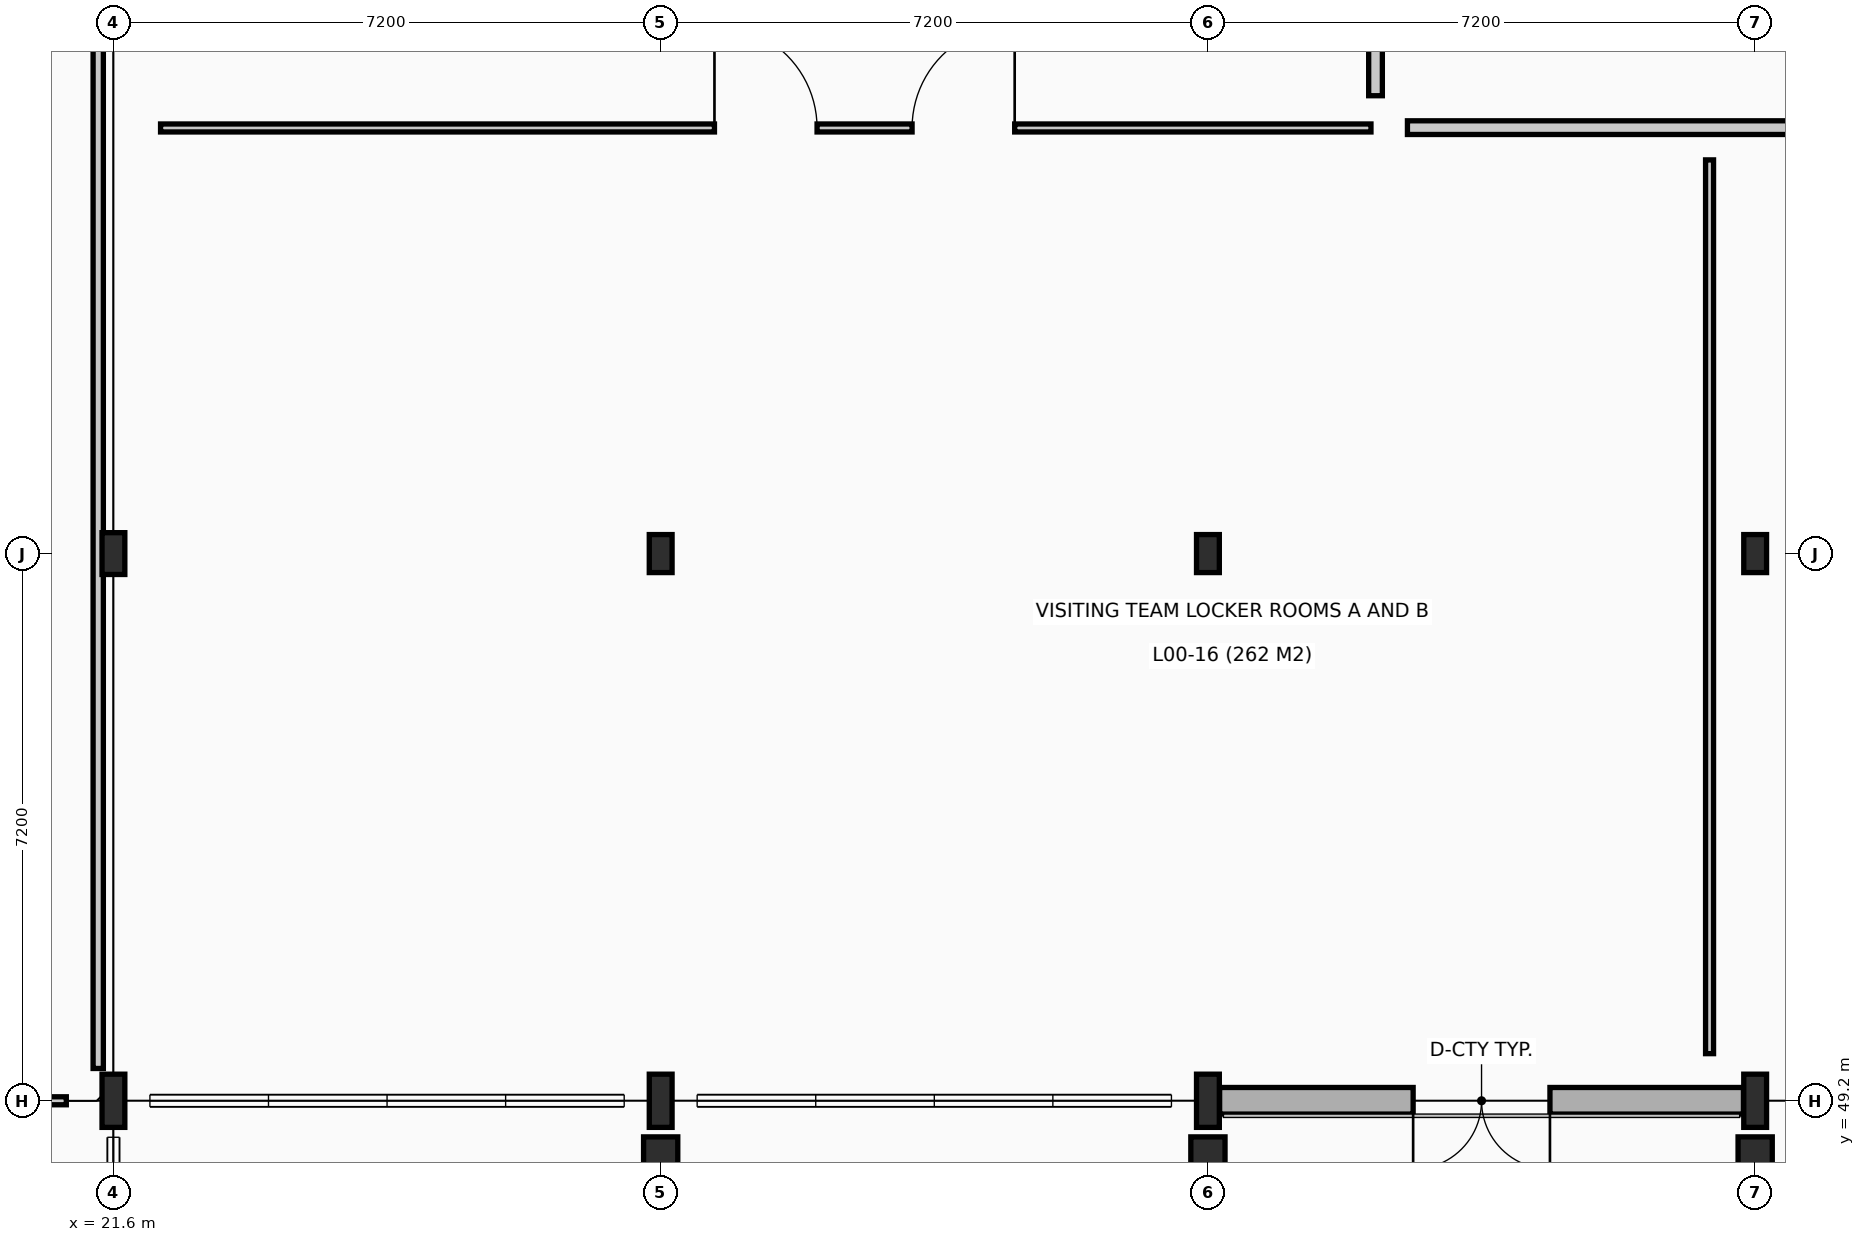
"""IFC4 building model, lengths in metres.
Left out: names, types, materials, properties, quantities, classifications, styles, units other than length and angle.
Written with IfcOpenShell. Run it as: python <this file> out.ifc"""

import sys

from ifc_helpers import new_model, si_unit, direction, frame, frame_2d, origin, origin_2d, place, context, subcontext, project, spatial, rectangle, i_section, extrude, element, fill, save


model = new_model("IFC4")
c1 = context("Model", 3, precision=1e-05, world=origin(), true_north=direction((0.0, 1.0)))
c2 = subcontext(c1, "Body", "Model", "MODEL_VIEW")
j1 = project(units=[si_unit("LENGTHUNIT", "METRE"), si_unit("PLANEANGLEUNIT", "RADIAN")], contexts=[c1])
p1 = place(None, origin())
s1 = spatial("IfcSite", under=j1, at=p1, CompositionType="ELEMENT")
p2 = place(p1, origin())
s2 = spatial("IfcBuilding", under=s1, at=p2, CompositionType="ELEMENT")
p3 = place(p2, origin())
s3 = spatial("IfcBuildingStorey", under=s2, at=p3, CompositionType="ELEMENT", Elevation=0.0)
p4 = place(p3, frame((21.6, 49.2, 0.0), z_axis=(0.0, 0.0, 1.0), x_axis=(1.0, 0.0, 0.0)))
e1 = element("IfcColumn", 1, at=p4, inside=s3, PredefinedType="COLUMN", context=c2, shape_type="SweptSolid", body=[
    extrude(i_section(OverallWidth=0.3, OverallDepth=0.7, WebThickness=0.017, FlangeThickness=0.032, at=origin_2d()), origin(), (0.0, 0.0, 1.0), 4.8),
])
p5 = place(p3, frame((21.6, 56.4, 0.0), z_axis=(0.0, 0.0, 1.0), x_axis=(1.0, 0.0, 0.0)))
e2 = element("IfcColumn", 2, at=p5, inside=s3, PredefinedType="COLUMN", context=c2, shape_type="SweptSolid", body=[
    extrude(i_section(OverallWidth=0.3, OverallDepth=0.55, WebThickness=0.015, FlangeThickness=0.029, at=origin_2d()), origin(), (0.0, 0.0, 1.0), 4.8),
])
p6 = place(p3, frame((28.8, 49.2, 0.0), z_axis=(0.0, 0.0, 1.0), x_axis=(1.0, 0.0, 0.0)))
e3 = element("IfcColumn", 3, at=p6, inside=s3, PredefinedType="COLUMN", context=c2, shape_type="SweptSolid", body=[
    extrude(i_section(OverallWidth=0.3, OverallDepth=0.7, WebThickness=0.017, FlangeThickness=0.032, at=origin_2d()), origin(), (0.0, 0.0, 1.0), 4.8),
])
p7 = place(p3, frame((28.8, 56.4, 0.0), z_axis=(0.0, 0.0, 1.0), x_axis=(1.0, 0.0, 0.0)))
e4 = element("IfcColumn", 4, at=p7, inside=s3, PredefinedType="COLUMN", context=c2, shape_type="SweptSolid", body=[
    extrude(i_section(OverallWidth=0.3, OverallDepth=0.5, WebThickness=0.014, FlangeThickness=0.028, at=origin_2d()), origin(), (0.0, 0.0, 1.0), 4.8),
])
p8 = place(p3, frame((36.0, 49.2, 0.0), z_axis=(0.0, 0.0, 1.0), x_axis=(1.0, 0.0, 0.0)))
e5 = element("IfcColumn", 5, at=p8, inside=s3, PredefinedType="COLUMN", context=c2, shape_type="SweptSolid", body=[
    extrude(i_section(OverallWidth=0.3, OverallDepth=0.7, WebThickness=0.017, FlangeThickness=0.032, at=origin_2d()), origin(), (0.0, 0.0, 1.0), 4.8),
])
p9 = place(p3, frame((36.0, 56.4, 0.0), z_axis=(0.0, 0.0, 1.0), x_axis=(1.0, 0.0, 0.0)))
e6 = element("IfcColumn", 6, at=p9, inside=s3, PredefinedType="COLUMN", context=c2, shape_type="SweptSolid", body=[
    extrude(i_section(OverallWidth=0.3, OverallDepth=0.5, WebThickness=0.014, FlangeThickness=0.028, at=origin_2d()), origin(), (0.0, 0.0, 1.0), 4.8),
])
p10 = place(p3, frame((43.2, 49.2, 0.0), z_axis=(0.0, 0.0, 1.0), x_axis=(1.0, 0.0, 0.0)))
e7 = element("IfcColumn", 7, at=p10, inside=s3, PredefinedType="COLUMN", context=c2, shape_type="SweptSolid", body=[
    extrude(i_section(OverallWidth=0.3, OverallDepth=0.7, WebThickness=0.017, FlangeThickness=0.032, at=origin_2d()), origin(), (0.0, 0.0, 1.0), 4.8),
])
p11 = place(p3, frame((43.2, 56.4, 0.0), z_axis=(0.0, 0.0, 1.0), x_axis=(1.0, 0.0, 0.0)))
e8 = element("IfcColumn", 8, at=p11, inside=s3, PredefinedType="COLUMN", context=c2, shape_type="SweptSolid", body=[
    extrude(i_section(OverallWidth=0.3, OverallDepth=0.5, WebThickness=0.014, FlangeThickness=0.028, at=origin_2d()), origin(), (0.0, 0.0, 1.0), 4.8),
])
for number, where, z_axis, x_axis in (
    (9, (28.8, 48.4, 0.0), (0.0, 0.0, 1.0), (1.0, 0.0, 0.0)),
    (10, (36.0, 48.4, 0.0), (0.0, 0.0, 1.0), (1.0, 0.0, 0.0)),
    (11, (43.2, 48.4, 0.0), (0.0, 0.0, 1.0), (1.0, 0.0, 0.0)),
):
    element("IfcColumn", number, at=place(p3, frame(where, z_axis=z_axis, x_axis=x_axis)), inside=s3, PredefinedType="PILASTER", context=c2, shape_type="SweptSolid", body=[
        extrude(rectangle(XDim=0.45, YDim=0.65, at=origin_2d()), origin(), (0.0, 0.0, 1.0), 4.8),
    ])
p12 = place(p3, frame((36.154, 49.2, 0.0), z_axis=(0.0, 0.0, 1.0), x_axis=(1.0, 0.0, 0.0)))
e12 = element("IfcWall", 12, at=p12, inside=s3, PredefinedType="SOLIDWALL", context=c2, shape_type="SweptSolid", body=[
    extrude(rectangle(XDim=6.892, YDim=0.35, at=frame_2d((3.446, 0.0))), origin(), (0.0, 0.0, 1.0), 4.065),
])
p13 = place(p12, frame((2.546, 0.0, 0.0)))
e13 = element("IfcOpeningElement", 13, at=p13, cuts=e12, PredefinedType="OPENING", context=c2, shape_type="SweptSolid", body=[
    extrude(rectangle(XDim=1.8, YDim=2.4, at=frame_2d((0.9, 1.2))), frame((0.0, 0.185, 0.0), z_axis=(0.0, -1.0, 0.0), x_axis=(1.0, 0.0, 0.0)), (0.0, 0.0, 1.0), 0.37),
])
p14 = place(p3, frame((38.625, 62.004, 0.0), z_axis=(0.0, 0.0, 1.0), x_axis=(1.0, 0.0, 0.0)))
e14 = element("IfcWall", 14, at=p14, inside=s3, PredefinedType="PARTITIONING", context=c2, shape_type="SweptSolid", body=[
    extrude(rectangle(XDim=22.75, YDim=0.18, at=frame_2d((11.375, 0.0))), origin(), (0.0, 0.0, 1.0), 4.565),
])
p15 = place(p14, frame((10.425, 0.0, 0.0)))
e15 = element("IfcOpeningElement", 15, at=p15, cuts=e14, PredefinedType="OPENING", context=c2, shape_type="SweptSolid", body=[
    extrude(rectangle(XDim=1.1, YDim=2.15, at=frame_2d((0.55, 1.075))), frame((0.0, 0.1, 0.0), z_axis=(0.0, -1.0, 0.0), x_axis=(1.0, 0.0, 0.0)), (0.0, 0.0, 1.0), 0.2),
])
p16 = place(p3, frame((38.205, 62.424, 0.0), z_axis=(0.0, 0.0, 1.0), x_axis=(0.0, 1.0, 0.0)))
e16 = element("IfcWall", 16, at=p16, inside=s3, PredefinedType="PARTITIONING", context=c2, shape_type="SweptSolid", body=[
    extrude(rectangle(XDim=12.156, YDim=0.18, at=frame_2d((6.078, 0.0))), origin(), (0.0, 0.0, 1.0), 4.565),
])
p17 = place(p3, frame((7.82, 49.2, 0.0), z_axis=(0.0, 0.0, 1.0), x_axis=(1.0, 0.0, 0.0)))
e17 = element("IfcWall", 17, at=p17, inside=s3, PredefinedType="PARTITIONING", context=c2, shape_type="SweptSolid", body=[
    extrude(rectangle(XDim=13.16, YDim=0.105, at=frame_2d((6.58, 0.0))), origin(), (0.0, 0.0, 1.0), 4.06),
])
p18 = place(p17, frame((7.805, 0.0, 0.0)))
e18 = element("IfcOpeningElement", 18, at=p18, cuts=e17, PredefinedType="OPENING", context=c2, shape_type="SweptSolid", body=[
    extrude(rectangle(XDim=1.35, YDim=2.15, at=frame_2d((0.675, 1.075))), frame((0.0, 0.062, 0.0), z_axis=(0.0, -1.0, 0.0), x_axis=(1.0, 0.0, 0.0)), (0.0, 0.0, 1.0), 0.125),
])
p19 = place(p3, frame((21.4, 49.625, 0.0), z_axis=(0.0, 0.0, 1.0), x_axis=(0.0, 1.0, 0.0)))
e19 = element("IfcWall", 19, at=p19, inside=s3, PredefinedType="PARTITIONING", context=c2, shape_type="SweptSolid", body=[
    extrude(rectangle(XDim=27.755, YDim=0.135, at=frame_2d((13.877, 0.0))), origin(), (0.0, 0.0, 1.0), 4.11),
])
p20 = place(p3, frame((22.22, 62.0, 0.0), z_axis=(0.0, 0.0, 1.0), x_axis=(1.0, 0.0, 0.0)))
e20 = element("IfcWall", 20, at=p20, inside=s3, PredefinedType="PARTITIONING", context=c2, shape_type="SweptSolid", body=[
    extrude(rectangle(XDim=15.925, YDim=0.105, at=frame_2d((7.963, 0.0))), origin(), (0.0, 0.0, 1.0), 4.565),
])
p21 = place(p20, frame((7.288, 0.0, 0.0)))
e21 = element("IfcOpeningElement", 21, at=p21, cuts=e20, PredefinedType="OPENING", context=c2, shape_type="SweptSolid", body=[
    extrude(rectangle(XDim=1.35, YDim=2.15, at=frame_2d((0.675, 1.075))), frame((0.0, 0.062, 0.0), z_axis=(0.0, -1.0, 0.0), x_axis=(1.0, 0.0, 0.0)), (0.0, 0.0, 1.0), 0.125),
])
p22 = place(p20, frame((9.888, 0.0, 0.0)))
e22 = element("IfcOpeningElement", 22, at=p22, cuts=e20, PredefinedType="OPENING", context=c2, shape_type="SweptSolid", body=[
    extrude(rectangle(XDim=1.35, YDim=2.15, at=frame_2d((0.675, 1.075))), frame((0.0, 0.062, 0.0), z_axis=(0.0, -1.0, 0.0), x_axis=(1.0, 0.0, 0.0)), (0.0, 0.0, 1.0), 0.125),
])
p23 = place(p3, frame((42.6, 49.82, 0.0), z_axis=(0.0, 0.0, 1.0), x_axis=(0.0, 1.0, 0.0)))
e23 = element("IfcWall", 23, at=p23, inside=s3, PredefinedType="PARTITIONING", context=c2, shape_type="SweptSolid", body=[
    extrude(rectangle(XDim=11.76, YDim=0.105, at=frame_2d((5.88, 0.0))), origin(), (0.0, 0.0, 1.0), 4.565),
])
p24 = place(p13, frame((1.8, 0.0, 0.0), z_axis=(0.0, 0.0, 1.0), x_axis=(-1.0, 0.0, 0.0)))
e24 = element("IfcDoor", 24, at=p24, inside=s3, OperationType="DOUBLE_DOOR_SINGLE_SWING", PredefinedType="DOOR", context=c2, shape_type="SweptSolid", body=[
    extrude(rectangle(XDim=1.8, YDim=2.4, at=frame_2d((0.9, 1.2))), frame((0.0, 0.025, 0.0), z_axis=(0.0, -1.0, 0.0), x_axis=(1.0, 0.0, 0.0)), (0.0, 0.0, 1.0), 0.05),
])
fill(e13, e24)
p25 = place(p21, frame((1.35, 0.0, 0.0), z_axis=(0.0, 0.0, 1.0), x_axis=(-1.0, 0.0, 0.0)))
e25 = element("IfcDoor", 25, at=p25, inside=s3, OperationType="SINGLE_SWING_RIGHT", PredefinedType="DOOR", context=c2, shape_type="SweptSolid", body=[
    extrude(rectangle(XDim=1.35, YDim=2.15, at=frame_2d((0.675, 1.075))), frame((0.0, 0.025, 0.0), z_axis=(0.0, -1.0, 0.0), x_axis=(1.0, 0.0, 0.0)), (0.0, 0.0, 1.0), 0.05),
])
fill(e21, e25)
p26 = place(p22, origin())
e26 = element("IfcDoor", 26, at=p26, inside=s3, OperationType="SINGLE_SWING_RIGHT", PredefinedType="DOOR", context=c2, shape_type="SweptSolid", body=[
    extrude(rectangle(XDim=1.35, YDim=2.15, at=frame_2d((0.675, 1.075))), frame((0.0, 0.025, 0.0), z_axis=(0.0, -1.0, 0.0), x_axis=(1.0, 0.0, 0.0)), (0.0, 0.0, 1.0), 0.05),
])
fill(e22, e26)
save(model, sys.argv[1])
